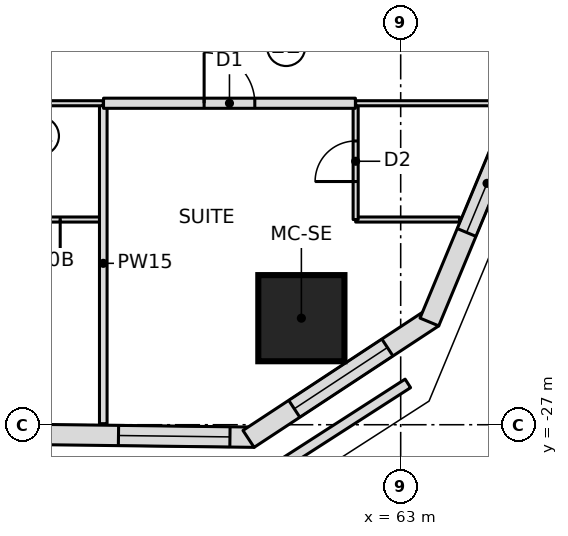
"""IFC4 building model, lengths in metres.
Left out: names, types, materials, properties, quantities, classifications, styles, units other than length and angle.
Written with IfcOpenShell. Run it as: python <this file> out.ifc"""

import sys

from ifc_helpers import new_model, si_unit, direction, frame, frame_2d, origin, origin_2d, place, context, subcontext, project, spatial, polyline, rectangle, outline, extrude, element, fill, save


model = new_model("IFC4")
c1 = context("Model", 3, precision=1e-05, world=origin(), true_north=direction((0.0, 1.0)))
c2 = subcontext(c1, "Body", "Model", "MODEL_VIEW")
j1 = project(units=[si_unit("LENGTHUNIT", "METRE"), si_unit("PLANEANGLEUNIT", "RADIAN")], contexts=[c1])
p1 = place(None, origin())
s1 = spatial("IfcSite", under=j1, at=p1, CompositionType="ELEMENT")
p2 = place(p1, origin())
s2 = spatial("IfcBuilding", under=s1, at=p2, CompositionType="ELEMENT")
p3 = place(p2, frame((0.0, 0.0, 80.3)))
s3 = spatial("IfcBuildingStorey", under=s2, at=p3, CompositionType="ELEMENT", Elevation=80.3)
p4 = place(p3, frame((61.04, -24.897, 0.0), z_axis=(0.0, 0.0, 1.0), x_axis=(1.0, 0.0, 0.0)))
e1 = element("IfcColumn", 1, at=p4, inside=s3, PredefinedType="COLUMN", context=c2, shape_type="SweptSolid", body=[
    extrude(rectangle(XDim=1.7, YDim=1.7, at=origin_2d()), origin(), (0.0, 0.0, 1.0), 4.6),
])
p5 = place(p3, frame((55.81, -27.192, 0.0), z_axis=(0.0, 0.0, 1.0), x_axis=(0.999919718849, -0.012671063772, 0.0)))
e2 = element("IfcWall", 2, at=p5, inside=s3, PredefinedType="NOTDEFINED", context=c2, shape_type="SweptSolid", body=[
    extrude(outline(polyline([(-0.031, -0.2), (4.3, -0.2), (4.177, 0.2), (0.031, 0.2), (-0.031, -0.2)])), origin(), (0.0, 0.0, 1.0), 4.3),
])
p6 = place(p5, frame((1.621, 0.0, 0.6)))
e3 = element("IfcOpeningElement", 3, at=p6, cuts=e2, PredefinedType="OPENING", context=c2, shape_type="SweptSolid", body=[
    extrude(outline(polyline([(0.0, 1.35), (0.084, 1.771), (0.322, 2.128), (0.679, 2.366), (1.1, 2.45), (1.521, 2.366), (1.878, 2.128), (2.116, 1.771), (2.2, 1.35), (2.2, 1.1), (2.116, 0.679), (1.878, 0.322), (1.521, 0.084), (1.1, 0.0), (0.679, 0.084), (0.322, 0.322), (0.084, 0.679), (0.0, 1.1), (0.0, 1.35)])), frame((0.0, 0.21, 0.0), z_axis=(0.0, -1.0, 0.0), x_axis=(1.0, 0.0, 0.0)), (0.0, 0.0, 1.0), 0.42),
])
p7 = place(p3, frame((60.049, -27.246, 0.0), z_axis=(0.0, 0.0, 1.0), x_axis=(0.835340523653, 0.549732852887, 0.0)))
e4 = element("IfcWall", 4, at=p7, inside=s3, PredefinedType="NOTDEFINED", context=c2, shape_type="SweptSolid", body=[
    extrude(outline(polyline([(-0.061, -0.2), (4.3, -0.2), (4.178, 0.2), (0.061, 0.2), (-0.061, -0.2)])), origin(), (0.0, 0.0, 1.0), 4.3),
])
p8 = place(p7, frame((1.02, 0.0, 0.6)))
e5 = element("IfcOpeningElement", 5, at=p8, cuts=e4, PredefinedType="OPENING", context=c2, shape_type="SweptSolid", body=[
    extrude(outline(polyline([(0.0, 1.35), (0.084, 1.771), (0.322, 2.128), (0.679, 2.366), (1.1, 2.45), (1.521, 2.366), (1.878, 2.128), (2.116, 1.771), (2.2, 1.35), (2.2, 1.1), (2.116, 0.679), (1.878, 0.322), (1.521, 0.084), (1.1, 0.0), (0.679, 0.084), (0.322, 0.322), (0.084, 0.679), (0.0, 1.1), (0.0, 1.35)])), frame((0.0, 0.21, 0.0), z_axis=(0.0, -1.0, 0.0), x_axis=(1.0, 0.0, 0.0)), (0.0, 0.0, 1.0), 0.42),
])
p9 = place(p3, frame((63.59, -24.916, 0.0), z_axis=(0.0, 0.0, 1.0), x_axis=(0.383997751971, 0.923334027577, 0.0)))
e6 = element("IfcWall", 6, at=p9, inside=s3, PredefinedType="NOTDEFINED", context=c2, shape_type="SweptSolid", body=[
    extrude(outline(polyline([(-0.061, -0.2), (4.27, -0.2), (4.208, 0.2), (0.061, 0.2), (-0.061, -0.2)])), origin(), (0.0, 0.0, 1.0), 4.3),
])
p10 = place(p9, frame((1.852, 0.0, 0.6)))
e7 = element("IfcOpeningElement", 7, at=p10, cuts=e6, PredefinedType="OPENING", context=c2, shape_type="SweptSolid", body=[
    extrude(outline(polyline([(0.0, 1.4), (0.08, 1.802), (0.308, 2.142), (0.648, 2.37), (1.05, 2.45), (1.452, 2.37), (1.792, 2.142), (2.02, 1.802), (2.1, 1.4), (2.1, 1.05), (2.02, 0.648), (1.792, 0.308), (1.452, 0.08), (1.05, 0.0), (0.648, 0.08), (0.308, 0.308), (0.08, 0.648), (0.0, 1.05), (0.0, 1.4)])), frame((0.0, 0.21, 0.0), z_axis=(0.0, -1.0, 0.0), x_axis=(1.0, 0.0, 0.0)), (0.0, 0.0, 1.0), 0.42),
])
p11 = place(p3, frame((59.778, -28.348, 0.0), z_axis=(0.0, 0.0, 1.0), x_axis=(0.84093838731, 0.5411308795, 0.0)))
e8 = element("IfcWall", 8, at=p11, inside=s3, PredefinedType="PARAPET", context=c2, shape_type="SweptSolid", body=[
    extrude(rectangle(XDim=3.999, YDim=0.2, at=frame_2d((2.0, 0.0))), origin(), (0.0, 0.0, 1.0), 1.1),
])
p12 = place(p3, frame((57.131, -22.95, 0.0), z_axis=(0.0, 0.0, 1.0), x_axis=(-1.0, 0.0, 0.0)))
e9 = element("IfcWall", 9, at=p12, inside=s3, PredefinedType="PARTITIONING", context=c2, shape_type="SweptSolid", body=[
    extrude(rectangle(XDim=2.5, YDim=0.1, at=frame_2d((1.25, 0.0))), origin(), (0.0, 0.0, 1.0), 4.3),
])
p13 = place(p12, frame((0.85, 0.0, 0.0)))
e10 = element("IfcOpeningElement", 10, at=p13, cuts=e9, PredefinedType="OPENING", context=c2, shape_type="SweptSolid", body=[
    extrude(rectangle(XDim=0.8, YDim=2.1, at=frame_2d((0.4, 1.05))), frame((0.0, 0.06, 0.0), z_axis=(0.0, -1.0, 0.0), x_axis=(1.0, 0.0, 0.0)), (0.0, 0.0, 1.0), 0.12),
])
p14 = place(p3, frame((64.16, -22.95, 0.0), z_axis=(0.0, 0.0, 1.0), x_axis=(-1.0, 0.0, 0.0)))
e11 = element("IfcWall", 11, at=p14, inside=s3, PredefinedType="PARTITIONING", context=c2, shape_type="SweptSolid", body=[
    extrude(rectangle(XDim=2.049, YDim=0.1, at=frame_2d((1.025, 0.0))), origin(), (0.0, 0.0, 1.0), 4.3),
])
p15 = place(p3, frame((62.111, -22.95, 0.0), z_axis=(0.0, 0.0, 1.0), x_axis=(0.0, 1.0, 0.0)))
e12 = element("IfcWall", 12, at=p15, inside=s3, PredefinedType="PARTITIONING", context=c2, shape_type="SweptSolid", body=[
    extrude(rectangle(XDim=2.3, YDim=0.1, at=frame_2d((1.15, 0.0))), origin(), (0.0, 0.0, 1.0), 4.3),
])
p16 = place(p15, frame((0.75, 0.0, 0.0)))
e13 = element("IfcOpeningElement", 13, at=p16, cuts=e12, PredefinedType="OPENING", context=c2, shape_type="SweptSolid", body=[
    extrude(rectangle(XDim=0.8, YDim=2.1, at=frame_2d((0.4, 1.05))), frame((0.0, 0.06, 0.0), z_axis=(0.0, -1.0, 0.0), x_axis=(1.0, 0.0, 0.0)), (0.0, 0.0, 1.0), 0.12),
])
p17 = place(p3, frame((57.131, -26.979, 0.0), z_axis=(0.0, 0.0, 1.0), x_axis=(0.0, 1.0, 0.0)))
e14 = element("IfcWall", 14, at=p17, inside=s3, PredefinedType="PARTITIONING", context=c2, shape_type="SweptSolid", body=[
    extrude(rectangle(XDim=6.329, YDim=0.15, at=frame_2d((3.165, 0.0))), origin(), (0.0, 0.0, 1.0), 4.3),
])
p18 = place(p3, frame((57.135, -20.655, 0.0), z_axis=(0.0, 0.0, 1.0), x_axis=(1.0, 0.0, 0.0)))
e15 = element("IfcWall", 15, at=p18, inside=s3, PredefinedType="PARTITIONING", context=c2, shape_type="SweptSolid", body=[
    extrude(rectangle(XDim=4.971, YDim=0.2, at=frame_2d((2.485, 0.0))), origin(), (0.0, 0.0, 1.0), 4.3),
])
p19 = place(p18, frame((1.985, 0.0, 0.0)))
e16 = element("IfcOpeningElement", 16, at=p19, cuts=e15, PredefinedType="OPENING", context=c2, shape_type="SweptSolid", body=[
    extrude(rectangle(XDim=1.0, YDim=2.1, at=frame_2d((0.5, 1.05))), frame((0.0, 0.11, 0.0), z_axis=(0.0, -1.0, 0.0), x_axis=(1.0, 0.0, 0.0)), (0.0, 0.0, 1.0), 0.22),
])
p20 = place(p3, frame((54.631, -20.655, 0.0), z_axis=(0.0, 0.0, 1.0), x_axis=(1.0, 0.0, 0.0)))
e17 = element("IfcWall", 17, at=p20, inside=s3, PredefinedType="PARTITIONING", context=c2, shape_type="SweptSolid", body=[
    extrude(rectangle(XDim=2.5, YDim=0.1, at=frame_2d((1.25, 0.0))), origin(), (0.0, 0.0, 1.0), 4.3),
])
p21 = place(p3, frame((62.111, -20.655, 0.0), z_axis=(0.0, 0.0, 1.0), x_axis=(1.0, 0.0, 0.0)))
e18 = element("IfcWall", 18, at=p21, inside=s3, PredefinedType="PARTITIONING", context=c2, shape_type="SweptSolid", body=[
    extrude(rectangle(XDim=2.906, YDim=0.1, at=frame_2d((1.453, 0.0))), origin(), (0.0, 0.0, 1.0), 4.3),
])
p22 = place(p6, origin())
e19 = element("IfcWindow", 19, at=p22, inside=s3, PartitioningType="SINGLE_PANEL", PredefinedType="WINDOW", context=c2, shape_type="SweptSolid", body=[
    extrude(outline(polyline([(0.0, 1.35), (0.084, 1.771), (0.322, 2.128), (0.679, 2.366), (1.1, 2.45), (1.521, 2.366), (1.878, 2.128), (2.116, 1.771), (2.2, 1.35), (2.2, 1.1), (2.116, 0.679), (1.878, 0.322), (1.521, 0.084), (1.1, 0.0), (0.679, 0.084), (0.322, 0.322), (0.084, 0.679), (0.0, 1.1), (0.0, 1.35)])), frame((0.0, 0.17, 0.0), z_axis=(0.0, -1.0, 0.0), x_axis=(1.0, 0.0, 0.0)), (0.0, 0.0, 1.0), 0.06),
])
fill(e3, e19)
p23 = place(p8, origin())
e20 = element("IfcWindow", 20, at=p23, inside=s3, PartitioningType="SINGLE_PANEL", PredefinedType="WINDOW", context=c2, shape_type="SweptSolid", body=[
    extrude(outline(polyline([(0.0, 1.35), (0.084, 1.771), (0.322, 2.128), (0.679, 2.366), (1.1, 2.45), (1.521, 2.366), (1.878, 2.128), (2.116, 1.771), (2.2, 1.35), (2.2, 1.1), (2.116, 0.679), (1.878, 0.322), (1.521, 0.084), (1.1, 0.0), (0.679, 0.084), (0.322, 0.322), (0.084, 0.679), (0.0, 1.1), (0.0, 1.35)])), frame((0.0, 0.17, 0.0), z_axis=(0.0, -1.0, 0.0), x_axis=(1.0, 0.0, 0.0)), (0.0, 0.0, 1.0), 0.06),
])
fill(e5, e20)
p24 = place(p10, origin())
e21 = element("IfcWindow", 21, at=p24, inside=s3, PartitioningType="SINGLE_PANEL", PredefinedType="WINDOW", context=c2, shape_type="SweptSolid", body=[
    extrude(outline(polyline([(0.0, 1.4), (0.08, 1.802), (0.308, 2.142), (0.648, 2.37), (1.05, 2.45), (1.452, 2.37), (1.792, 2.142), (2.02, 1.802), (2.1, 1.4), (2.1, 1.05), (2.02, 0.648), (1.792, 0.308), (1.452, 0.08), (1.05, 0.0), (0.648, 0.08), (0.308, 0.308), (0.08, 0.648), (0.0, 1.05), (0.0, 1.4)])), frame((0.0, 0.17, 0.0), z_axis=(0.0, -1.0, 0.0), x_axis=(1.0, 0.0, 0.0)), (0.0, 0.0, 1.0), 0.06),
])
fill(e7, e21)
p25 = place(p13, origin())
e22 = element("IfcDoor", 22, at=p25, inside=s3, OperationType="SINGLE_SWING_LEFT", PredefinedType="DOOR", context=c2, shape_type="SweptSolid", body=[
    extrude(rectangle(XDim=0.8, YDim=2.1, at=frame_2d((0.4, 1.05))), frame((0.0, 0.025, 0.0), z_axis=(0.0, -1.0, 0.0), x_axis=(1.0, 0.0, 0.0)), (0.0, 0.0, 1.0), 0.05),
])
fill(e10, e22)
p26 = place(p16, origin())
e23 = element("IfcDoor", 23, at=p26, inside=s3, OperationType="SINGLE_SWING_LEFT", PredefinedType="DOOR", context=c2, shape_type="SweptSolid", body=[
    extrude(rectangle(XDim=0.8, YDim=2.1, at=frame_2d((0.4, 1.05))), frame((0.0, 0.025, 0.0), z_axis=(0.0, -1.0, 0.0), x_axis=(1.0, 0.0, 0.0)), (0.0, 0.0, 1.0), 0.05),
])
fill(e13, e23)
p27 = place(p19, origin())
e24 = element("IfcDoor", 24, at=p27, inside=s3, OperationType="SINGLE_SWING_LEFT", PredefinedType="DOOR", context=c2, shape_type="SweptSolid", body=[
    extrude(rectangle(XDim=1.0, YDim=2.1, at=frame_2d((0.5, 1.05))), frame((0.0, 0.025, 0.0), z_axis=(0.0, -1.0, 0.0), x_axis=(1.0, 0.0, 0.0)), (0.0, 0.0, 1.0), 0.05),
])
fill(e16, e24)
save(model, sys.argv[1])
